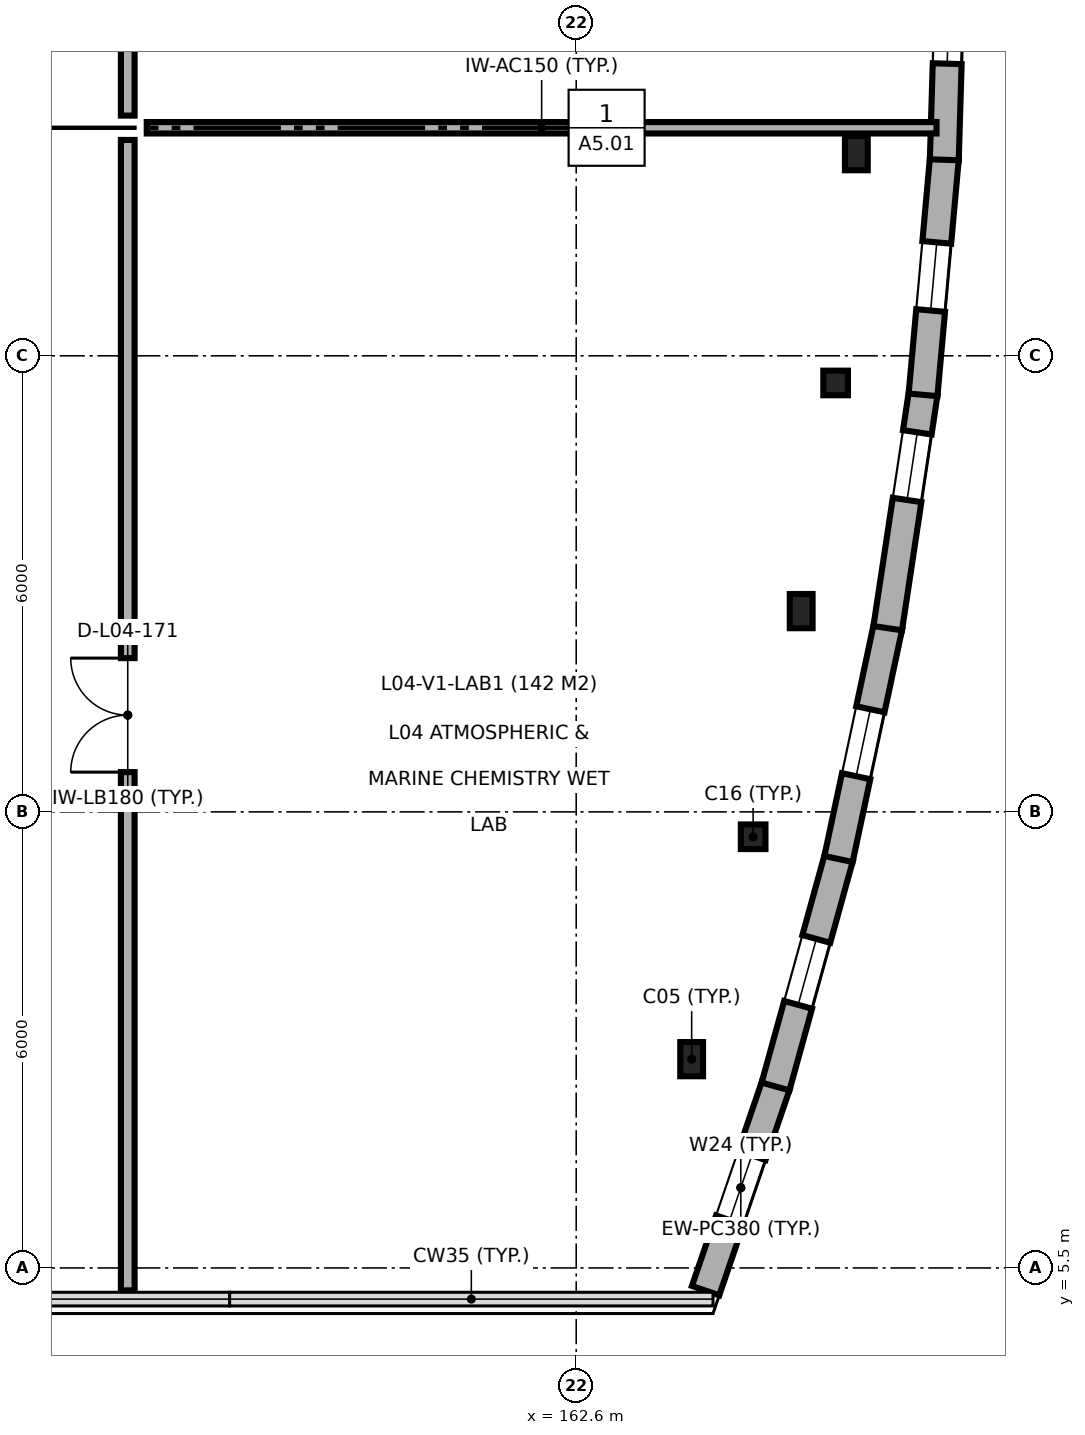
"""IFC4 building model, lengths in metres.
Left out: names, types, materials, properties, quantities, classifications, styles, units other than length and angle.
Written with IfcOpenShell. Run it as: python <this file> out.ifc"""

import sys

from ifc_helpers import new_model, si_unit, direction, frame, frame_2d, origin, origin_2d, place, context, subcontext, project, spatial, rectangle, hollow_circle, i_section, extrude, element, fill, save


model = new_model("IFC4")
c1 = context("Model", 3, precision=1e-05, world=origin(), true_north=direction((0.0, 1.0)))
c2 = subcontext(c1, "Body", "Model", "MODEL_VIEW")
j1 = project(units=[si_unit("LENGTHUNIT", "METRE"), si_unit("PLANEANGLEUNIT", "RADIAN")], contexts=[c1])
p1 = place(None, origin())
s1 = spatial("IfcSite", under=j1, at=p1, CompositionType="ELEMENT")
p2 = place(p1, origin())
s2 = spatial("IfcBuilding", under=s1, at=p2, CompositionType="ELEMENT")
p3 = place(p2, frame((0.0, 0.0, 18.3)))
s3 = spatial("IfcBuildingStorey", under=s2, at=p3, CompositionType="ELEMENT", Elevation=18.3)
p4 = place(p3, frame((164.119, 8.247, 0.0), z_axis=(0.0, 0.0, 1.0), x_axis=(1.0, 0.0, 0.0)))
e1 = element("IfcColumn", 1, at=p4, inside=s3, PredefinedType="COLUMN", context=c2, shape_type="SweptSolid", body=[
    extrude(i_section(OverallWidth=0.3, OverallDepth=0.45, WebThickness=0.014, FlangeThickness=0.026, FilletRadius=0.027, at=origin_2d()), origin(), (0.0, 0.0, 1.0), 4.5),
])
p5 = place(p3, frame((164.928, 11.173, 0.0), z_axis=(0.0, 0.0, 1.0), x_axis=(1.0, 0.0, 0.0)))
e2 = element("IfcColumn", 2, at=p5, inside=s3, PredefinedType="COLUMN", context=c2, shape_type="SweptSolid", body=[
    extrude(hollow_circle(Radius=0.162, WallThickness=0.016, at=origin_2d()), origin(), (0.0, 0.0, 1.0), 4.5),
])
p6 = place(p3, frame((165.56, 14.142, 0.0), z_axis=(0.0, 0.0, 1.0), x_axis=(1.0, 0.0, 0.0)))
e3 = element("IfcColumn", 3, at=p6, inside=s3, PredefinedType="COLUMN", context=c2, shape_type="SweptSolid", body=[
    extrude(i_section(OverallWidth=0.3, OverallDepth=0.45, WebThickness=0.014, FlangeThickness=0.026, FilletRadius=0.027, at=origin_2d()), origin(), (0.0, 0.0, 1.0), 4.5),
])
p7 = place(p3, frame((166.013, 17.143, 0.0), z_axis=(0.0, 0.0, 1.0), x_axis=(1.0, 0.0, 0.0)))
e4 = element("IfcColumn", 4, at=p7, inside=s3, PredefinedType="COLUMN", context=c2, shape_type="SweptSolid", body=[
    extrude(hollow_circle(Radius=0.162, WallThickness=0.016, at=origin_2d()), origin(), (0.0, 0.0, 1.0), 4.5),
])
p8 = place(p3, frame((166.285, 20.166, 0.0), z_axis=(0.0, 0.0, 1.0), x_axis=(1.0, 0.0, 0.0)))
e5 = element("IfcColumn", 5, at=p8, inside=s3, PredefinedType="COLUMN", context=c2, shape_type="SweptSolid", body=[
    extrude(i_section(OverallWidth=0.3, OverallDepth=0.45, WebThickness=0.014, FlangeThickness=0.026, FilletRadius=0.027, at=origin_2d()), origin(), (0.0, 0.0, 1.0), 4.5),
])
p9 = place(p3, frame((164.302, 5.201, 0.0), z_axis=(0.0, 0.0, 1.0), x_axis=(0.323739917301, 0.946146112366, 0.0)))
e6 = element("IfcWall", 6, at=p9, inside=s3, PredefinedType="SOLIDWALL", context=c2, shape_type="SweptSolid", body=[
    extrude(rectangle(XDim=2.863, YDim=0.38, at=frame_2d((1.431, 0.0))), origin(), (0.0, 0.0, 1.0), 4.28),
])
p10 = place(p9, frame((0.981, 0.0, 0.9)))
e7 = element("IfcOpeningElement", 7, at=p10, cuts=e6, PredefinedType="OPENING", context=c2, shape_type="SweptSolid", body=[
    extrude(rectangle(XDim=0.9, YDim=1.8, at=frame_2d((0.45, 0.9))), frame((0.0, 0.2, 0.0), z_axis=(0.0, -1.0, 0.0), x_axis=(1.0, 0.0, 0.0)), (0.0, 0.0, 1.0), 0.4),
])
p11 = place(p3, frame((165.222, 7.888, 0.0), z_axis=(0.0, 0.0, 1.0), x_axis=(0.266536691105, 0.963824772609, 0.0)))
e8 = element("IfcWall", 8, at=p11, inside=s3, PredefinedType="SOLIDWALL", context=c2, shape_type="SweptSolid", body=[
    extrude(rectangle(XDim=3.128, YDim=0.38, at=frame_2d((1.564, 0.0))), origin(), (0.0, 0.0, 1.0), 4.28),
])
p12 = place(p11, frame((1.114, 0.0, 0.9)))
e9 = element("IfcOpeningElement", 9, at=p12, cuts=e8, PredefinedType="OPENING", context=c2, shape_type="SweptSolid", body=[
    extrude(rectangle(XDim=0.9, YDim=1.8, at=frame_2d((0.45, 0.9))), frame((0.0, 0.2, 0.0), z_axis=(0.0, -1.0, 0.0), x_axis=(1.0, 0.0, 0.0)), (0.0, 0.0, 1.0), 0.4),
])
p13 = place(p3, frame((166.051, 10.88, 0.0), z_axis=(0.0, 0.0, 1.0), x_axis=(0.208287141705, 0.978067720866, 0.0)))
e10 = element("IfcWall", 10, at=p13, inside=s3, PredefinedType="SOLIDWALL", context=c2, shape_type="SweptSolid", body=[
    extrude(rectangle(XDim=3.128, YDim=0.38, at=frame_2d((1.564, 0.0))), origin(), (0.0, 0.0, 1.0), 4.28),
])
p14 = place(p13, frame((1.114, 0.0, 0.9)))
e11 = element("IfcOpeningElement", 11, at=p14, cuts=e10, PredefinedType="OPENING", context=c2, shape_type="SweptSolid", body=[
    extrude(rectangle(XDim=0.9, YDim=1.8, at=frame_2d((0.45, 0.9))), frame((0.0, 0.2, 0.0), z_axis=(0.0, -1.0, 0.0), x_axis=(1.0, 0.0, 0.0)), (0.0, 0.0, 1.0), 0.4),
])
p15 = place(p3, frame((166.698, 13.917, 0.0), z_axis=(0.0, 0.0, 1.0), x_axis=(0.149218139282, 0.988804301624, 0.0)))
e12 = element("IfcWall", 12, at=p15, inside=s3, PredefinedType="SOLIDWALL", context=c2, shape_type="SweptSolid", body=[
    extrude(rectangle(XDim=3.128, YDim=0.38, at=frame_2d((1.564, 0.0))), origin(), (0.0, 0.0, 1.0), 4.28),
])
p16 = place(p15, frame((1.706, 0.0, 0.9)))
e13 = element("IfcOpeningElement", 13, at=p16, cuts=e12, PredefinedType="OPENING", context=c2, shape_type="SweptSolid", body=[
    extrude(rectangle(XDim=0.9, YDim=1.8, at=frame_2d((0.45, 0.9))), frame((0.0, 0.2, 0.0), z_axis=(0.0, -1.0, 0.0), x_axis=(1.0, 0.0, 0.0)), (0.0, 0.0, 1.0), 0.4),
])
p17 = place(p3, frame((167.163, 16.987, 0.0), z_axis=(0.0, 0.0, 1.0), x_axis=(0.089747627339, 0.995964539222, 0.0)))
e14 = element("IfcWall", 14, at=p17, inside=s3, PredefinedType="SOLIDWALL", context=c2, shape_type="SweptSolid", body=[
    extrude(rectangle(XDim=3.128, YDim=0.38, at=frame_2d((1.564, 0.0))), origin(), (0.0, 0.0, 1.0), 4.28),
])
p18 = place(p17, frame((1.114, 0.0, 0.9)))
e15 = element("IfcOpeningElement", 15, at=p18, cuts=e14, PredefinedType="OPENING", context=c2, shape_type="SweptSolid", body=[
    extrude(rectangle(XDim=0.9, YDim=1.8, at=frame_2d((0.45, 0.9))), frame((0.0, 0.2, 0.0), z_axis=(0.0, -1.0, 0.0), x_axis=(1.0, 0.0, 0.0)), (0.0, 0.0, 1.0), 0.4),
])
p19 = place(p3, frame((167.443, 20.079, 0.0), z_axis=(0.0, 0.0, 1.0), x_axis=(0.02996779607, 0.999550864738, 0.0)))
e16 = element("IfcWall", 16, at=p19, inside=s3, PredefinedType="SOLIDWALL", context=c2, shape_type="SweptSolid", body=[
    extrude(rectangle(XDim=3.128, YDim=0.38, at=frame_2d((1.564, 0.0))), origin(), (0.0, 0.0, 1.0), 4.28),
])
p20 = place(p19, frame((1.265, 0.0, 0.9)))
e17 = element("IfcOpeningElement", 17, at=p20, cuts=e16, PredefinedType="OPENING", context=c2, shape_type="SweptSolid", body=[
    extrude(rectangle(XDim=0.9, YDim=1.8, at=frame_2d((0.45, 0.9))), frame((0.0, 0.2, 0.0), z_axis=(0.0, -1.0, 0.0), x_axis=(1.0, 0.0, 0.0)), (0.0, 0.0, 1.0), 0.4),
])
p21 = place(p3, frame((156.95, 20.5, 0.0), z_axis=(0.0, 0.0, 1.0), x_axis=(1.0, 0.0, 0.0)))
e18 = element("IfcWall", 18, at=p21, inside=s3, PredefinedType="PARTITIONING", context=c2, shape_type="SweptSolid", body=[
    extrude(rectangle(XDim=10.39, YDim=0.15, at=frame_2d((5.195, 0.0))), origin(), (0.0, 0.0, 1.0), 3.78),
])
p22 = place(p3, frame((156.7, 5.205, 0.0), z_axis=(0.0, 0.0, 1.0), x_axis=(0.0, 1.0, 0.0)))
e19 = element("IfcWall", 19, at=p22, inside=s3, PredefinedType="PARTITIONING", context=c2, shape_type="SweptSolid", body=[
    extrude(rectangle(XDim=15.135, YDim=0.18, at=frame_2d((7.567, 0.0))), origin(), (0.0, 0.0, 1.0), 4.28),
])
p23 = place(p22, frame((6.818, 0.0, 0.0)))
e20 = element("IfcOpeningElement", 20, at=p23, cuts=e19, PredefinedType="OPENING", context=c2, shape_type="SweptSolid", body=[
    extrude(rectangle(XDim=1.5, YDim=2.2, at=frame_2d((0.75, 1.1))), frame((0.0, 0.1, 0.0), z_axis=(0.0, -1.0, 0.0), x_axis=(1.0, 0.0, 0.0)), (0.0, 0.0, 1.0), 0.2),
])
p24 = place(p3, frame((156.7, 20.66, 0.0), z_axis=(0.0, 0.0, 1.0), x_axis=(0.0, 1.0, 0.0)))
e21 = element("IfcWall", 21, at=p24, inside=s3, PredefinedType="PARTITIONING", context=c2, shape_type="SweptSolid", body=[
    extrude(rectangle(XDim=13.18, YDim=0.18, at=frame_2d((6.59, 0.0))), origin(), (0.0, 0.0, 1.0), 4.28),
])
p25 = place(p24, frame((6.04, 0.0, 0.0)))
e22 = element("IfcOpeningElement", 22, at=p25, cuts=e21, PredefinedType="OPENING", context=c2, shape_type="SweptSolid", body=[
    extrude(rectangle(XDim=1.1, YDim=2.15, at=frame_2d((0.55, 1.075))), frame((0.0, 0.1, 0.0), z_axis=(0.0, -1.0, 0.0), x_axis=(1.0, 0.0, 0.0)), (0.0, 0.0, 1.0), 0.2),
])
p26 = place(p10, origin())
e23 = element("IfcWindow", 23, at=p26, inside=s3, PartitioningType="SINGLE_PANEL", PredefinedType="WINDOW", context=c2, shape_type="SweptSolid", body=[
    extrude(rectangle(XDim=0.9, YDim=1.8, at=frame_2d((0.45, 0.9))), frame((0.0, 0.03, 0.0), z_axis=(0.0, -1.0, 0.0), x_axis=(1.0, 0.0, 0.0)), (0.0, 0.0, 1.0), 0.06),
])
fill(e7, e23)
p27 = place(p12, origin())
e24 = element("IfcWindow", 24, at=p27, inside=s3, PartitioningType="SINGLE_PANEL", PredefinedType="WINDOW", context=c2, shape_type="SweptSolid", body=[
    extrude(rectangle(XDim=0.9, YDim=1.8, at=frame_2d((0.45, 0.9))), frame((0.0, 0.03, 0.0), z_axis=(0.0, -1.0, 0.0), x_axis=(1.0, 0.0, 0.0)), (0.0, 0.0, 1.0), 0.06),
])
fill(e9, e24)
p28 = place(p14, origin())
e25 = element("IfcWindow", 25, at=p28, inside=s3, PartitioningType="SINGLE_PANEL", PredefinedType="WINDOW", context=c2, shape_type="SweptSolid", body=[
    extrude(rectangle(XDim=0.9, YDim=1.8, at=frame_2d((0.45, 0.9))), frame((0.0, 0.03, 0.0), z_axis=(0.0, -1.0, 0.0), x_axis=(1.0, 0.0, 0.0)), (0.0, 0.0, 1.0), 0.06),
])
fill(e11, e25)
p29 = place(p16, origin())
e26 = element("IfcWindow", 26, at=p29, inside=s3, PartitioningType="SINGLE_PANEL", PredefinedType="WINDOW", context=c2, shape_type="SweptSolid", body=[
    extrude(rectangle(XDim=0.9, YDim=1.8, at=frame_2d((0.45, 0.9))), frame((0.0, 0.03, 0.0), z_axis=(0.0, -1.0, 0.0), x_axis=(1.0, 0.0, 0.0)), (0.0, 0.0, 1.0), 0.06),
])
fill(e13, e26)
p30 = place(p18, origin())
e27 = element("IfcWindow", 27, at=p30, inside=s3, PartitioningType="SINGLE_PANEL", PredefinedType="WINDOW", context=c2, shape_type="SweptSolid", body=[
    extrude(rectangle(XDim=0.9, YDim=1.8, at=frame_2d((0.45, 0.9))), frame((0.0, 0.03, 0.0), z_axis=(0.0, -1.0, 0.0), x_axis=(1.0, 0.0, 0.0)), (0.0, 0.0, 1.0), 0.06),
])
fill(e15, e27)
p31 = place(p20, origin())
e28 = element("IfcWindow", 28, at=p31, inside=s3, PartitioningType="SINGLE_PANEL", PredefinedType="WINDOW", context=c2, shape_type="SweptSolid", body=[
    extrude(rectangle(XDim=0.9, YDim=1.8, at=frame_2d((0.45, 0.9))), frame((0.0, 0.03, 0.0), z_axis=(0.0, -1.0, 0.0), x_axis=(1.0, 0.0, 0.0)), (0.0, 0.0, 1.0), 0.06),
])
fill(e17, e28)
p32 = place(p23, origin())
e29 = element("IfcDoor", 29, at=p32, inside=s3, OperationType="DOUBLE_DOOR_SINGLE_SWING", PredefinedType="DOOR", context=c2, shape_type="SweptSolid", body=[
    extrude(rectangle(XDim=1.5, YDim=2.2, at=frame_2d((0.75, 1.1))), frame((0.0, 0.025, 0.0), z_axis=(0.0, -1.0, 0.0), x_axis=(1.0, 0.0, 0.0)), (0.0, 0.0, 1.0), 0.05),
])
fill(e20, e29)
save(model, sys.argv[1])
